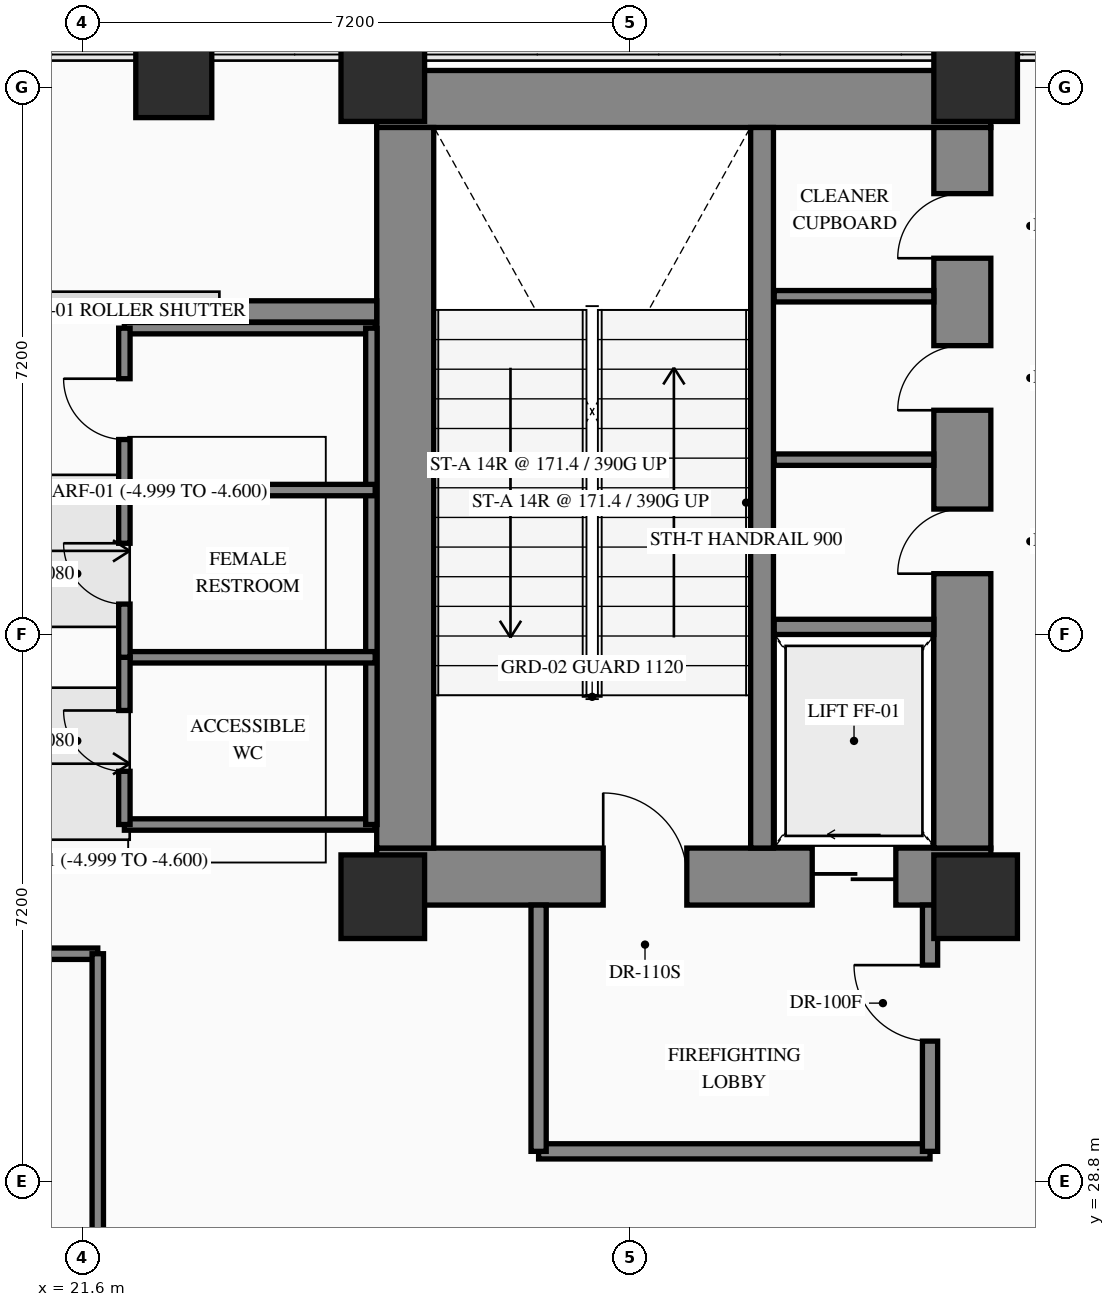
"""IFC4 building model, lengths in metres.
Left out: names, types, materials, properties, quantities, classifications, styles, units other than length and angle.
Written with IfcOpenShell. Run it as: python <this file> out.ifc"""

import sys

from ifc_helpers import new_model, si_unit, direction, frame, frame_2d, origin, origin_2d, place, context, subcontext, project, spatial, rectangle, hollow_rectangle, extrude, element, fill, save


model = new_model("IFC4")
c1 = context("Model", 3, precision=1e-05, world=origin(), true_north=direction((0.0, 1.0)))
c2 = subcontext(c1, "Body", "Model", "MODEL_VIEW")
j1 = project(units=[si_unit("LENGTHUNIT", "METRE"), si_unit("PLANEANGLEUNIT", "RADIAN")], contexts=[c1])
p1 = place(None, origin())
s1 = spatial("IfcSite", under=j1, at=p1, CompositionType="ELEMENT")
p2 = place(p1, origin())
s2 = spatial("IfcBuilding", under=s1, at=p2, CompositionType="ELEMENT")
p3 = place(p2, frame((0.0, 0.0, -4.8)))
s3 = spatial("IfcBuildingStorey", under=s2, at=p3, CompositionType="ELEMENT", Elevation=-4.8)
p4 = place(p3, frame((25.47, 32.815, 0.0), z_axis=(0.0, 0.0, 1.0), x_axis=(1.0, 0.0, 0.0)))
e1 = element("IfcWall", 1, at=p4, inside=s3, PredefinedType="SHEAR", context=c2, shape_type="SweptSolid", body=[
    extrude(rectangle(XDim=8.08, YDim=0.75, at=frame_2d((4.04, 0.0))), origin(), (0.0, 0.0, 1.0), 4.8),
])
p5 = place(p4, frame((2.98, 0.0, 0.0)))
e2 = element("IfcOpeningElement", 2, at=p5, cuts=e1, PredefinedType="OPENING", context=c2, shape_type="SweptSolid", body=[
    extrude(rectangle(XDim=1.1, YDim=2.2, at=frame_2d((0.55, 1.1))), frame((0.0, 0.385, 0.0), z_axis=(0.0, -1.0, 0.0), x_axis=(1.0, 0.0, 0.0)), (0.0, 0.0, 1.0), 0.77),
])
p6 = place(p4, frame((5.73, 0.0, 0.0)))
e3 = element("IfcOpeningElement", 3, at=p6, cuts=e1, PredefinedType="OPENING", context=c2, shape_type="SweptSolid", body=[
    extrude(rectangle(XDim=1.1, YDim=2.15, at=frame_2d((0.55, 1.075))), frame((0.0, 0.385, 0.0), z_axis=(0.0, -1.0, 0.0), x_axis=(1.0, 0.0, 0.0)), (0.0, 0.0, 1.0), 0.77),
])
p7 = place(p3, frame((25.47, 43.045, 0.0), z_axis=(0.0, 0.0, 1.0), x_axis=(1.0, 0.0, 0.0)))
e4 = element("IfcWall", 4, at=p7, inside=s3, PredefinedType="SHEAR", context=c2, shape_type="SweptSolid", body=[
    extrude(rectangle(XDim=8.08, YDim=0.75, at=frame_2d((4.04, 0.0))), origin(), (0.0, 0.0, 1.0), 4.8),
])
p8 = place(p3, frame((25.845, 33.19, 0.0), z_axis=(0.0, 0.0, 1.0), x_axis=(0.0, 1.0, 0.0)))
e5 = element("IfcWall", 5, at=p8, inside=s3, PredefinedType="SHEAR", context=c2, shape_type="SweptSolid", body=[
    extrude(rectangle(XDim=9.48, YDim=0.75, at=frame_2d((4.74, 0.0))), origin(), (0.0, 0.0, 1.0), 4.8),
])
p9 = place(p3, frame((33.175, 33.19, 0.0), z_axis=(0.0, 0.0, 1.0), x_axis=(0.0, 1.0, 0.0)))
e6 = element("IfcWall", 6, at=p9, inside=s3, PredefinedType="SHEAR", context=c2, shape_type="SweptSolid", body=[
    extrude(rectangle(XDim=9.48, YDim=0.75, at=frame_2d((4.74, 0.0))), origin(), (0.0, 0.0, 1.0), 4.8),
])
p10 = place(p9, frame((3.61, 0.0, 0.0)))
e7 = element("IfcOpeningElement", 7, at=p10, cuts=e6, PredefinedType="OPENING", context=c2, shape_type="SweptSolid", body=[
    extrude(rectangle(XDim=0.85, YDim=2.08, at=frame_2d((0.425, 1.04))), frame((0.0, 0.385, 0.0), z_axis=(0.0, -1.0, 0.0), x_axis=(1.0, 0.0, 0.0)), (0.0, 0.0, 1.0), 0.77),
])
p11 = place(p9, frame((5.76, 0.0, 0.0)))
e8 = element("IfcOpeningElement", 8, at=p11, cuts=e6, PredefinedType="OPENING", context=c2, shape_type="SweptSolid", body=[
    extrude(rectangle(XDim=0.85, YDim=2.08, at=frame_2d((0.425, 1.04))), frame((0.0, 0.385, 0.0), z_axis=(0.0, -1.0, 0.0), x_axis=(1.0, 0.0, 0.0)), (0.0, 0.0, 1.0), 0.77),
])
p12 = place(p9, frame((7.76, 0.0, 0.0)))
e9 = element("IfcOpeningElement", 9, at=p12, cuts=e6, PredefinedType="OPENING", context=c2, shape_type="SweptSolid", body=[
    extrude(rectangle(XDim=0.85, YDim=2.08, at=frame_2d((0.425, 1.04))), frame((0.0, 0.385, 0.0), z_axis=(0.0, -1.0, 0.0), x_axis=(1.0, 0.0, 0.0)), (0.0, 0.0, 1.0), 0.77),
])
p13 = place(p3, frame((30.54, 33.19, 0.0), z_axis=(0.0, 0.0, 1.0), x_axis=(0.0, 1.0, 0.0)))
e10 = element("IfcWall", 10, at=p13, inside=s3, PredefinedType="SHEAR", context=c2, shape_type="SweptSolid", body=[
    extrude(rectangle(XDim=9.48, YDim=0.3, at=frame_2d((4.74, 0.0))), origin(), (0.0, 0.0, 1.0), 4.8),
])
for number, where, z_axis, x_axis in (
    (11, (25.55, 32.55, 0.0), (0.0, 0.0, 1.0), (1.0, 0.0, 0.0)),
    (12, (33.35, 32.55, 0.0), (0.0, 0.0, 1.0), (1.0, 0.0, 0.0)),
    (13, (25.55, 43.3, 0.0), (0.0, 0.0, 1.0), (1.0, 0.0, 0.0)),
    (14, (33.35, 43.3, 0.0), (0.0, 0.0, 1.0), (1.0, 0.0, 0.0)),
):
    element("IfcColumn", number, at=place(p3, frame(where, z_axis=z_axis, x_axis=x_axis)), inside=s3, PredefinedType="COLUMN", context=c2, shape_type="SweptSolid", body=[
        extrude(rectangle(XDim=1.1, YDim=1.1, at=origin_2d()), origin(), (0.0, 0.0, 1.0), 4.8),
    ])
p14 = place(p3, frame((22.8, 43.3, 0.0), z_axis=(0.0, 0.0, 1.0), x_axis=(1.0, 0.0, 0.0)))
e15 = element("IfcColumn", 15, at=p14, inside=s3, PredefinedType="COLUMN", context=c2, shape_type="SweptSolid", body=[
    extrude(hollow_rectangle(XDim=1.0, YDim=1.0, WallThickness=0.038, at=origin_2d()), origin(), (0.0, 0.0, 1.0), 4.8),
])
p15 = place(p3, frame((0.8, 40.25, 0.0), z_axis=(0.0, 0.0, 1.0), x_axis=(1.0, 0.0, 0.0)))
e16 = element("IfcWall", 16, at=p15, inside=s3, PredefinedType="STANDARD", context=c2, shape_type="SweptSolid", body=[
    extrude(rectangle(XDim=24.67, YDim=0.28, at=frame_2d((12.335, 0.0))), origin(), (0.0, 0.0, 1.0), 3.5),
])
p16 = place(p15, frame((2.2, 0.0, 0.0)))
e17 = element("IfcOpeningElement", 17, at=p16, cuts=e16, PredefinedType="OPENING", context=c2, shape_type="SweptSolid", body=[
    extrude(rectangle(XDim=3.0, YDim=2.8, at=frame_2d((1.5, 1.4))), frame((0.0, 0.15, 0.0), z_axis=(0.0, -1.0, 0.0), x_axis=(1.0, 0.0, 0.0)), (0.0, 0.0, 1.0), 0.3),
])
p17 = place(p15, frame((6.4, 0.0, 0.0)))
e18 = element("IfcOpeningElement", 18, at=p17, cuts=e16, PredefinedType="OPENING", context=c2, shape_type="SweptSolid", body=[
    extrude(rectangle(XDim=3.0, YDim=2.8, at=frame_2d((1.5, 1.4))), frame((0.0, 0.15, 0.0), z_axis=(0.0, -1.0, 0.0), x_axis=(1.0, 0.0, 0.0)), (0.0, 0.0, 1.0), 0.3),
])
p18 = place(p15, frame((12.8, 0.0, 0.0)))
e19 = element("IfcOpeningElement", 19, at=p18, cuts=e16, PredefinedType="OPENING", context=c2, shape_type="SweptSolid", body=[
    extrude(rectangle(XDim=3.0, YDim=2.8, at=frame_2d((1.5, 1.4))), frame((0.0, 0.15, 0.0), z_axis=(0.0, -1.0, 0.0), x_axis=(1.0, 0.0, 0.0)), (0.0, 0.0, 1.0), 0.3),
])
p19 = place(p15, frame((19.6, 0.0, 0.0)))
e20 = element("IfcOpeningElement", 20, at=p19, cuts=e16, PredefinedType="OPENING", context=c2, shape_type="SweptSolid", body=[
    extrude(rectangle(XDim=3.0, YDim=2.8, at=frame_2d((1.5, 1.4))), frame((0.0, 0.15, 0.0), z_axis=(0.0, -1.0, 0.0), x_axis=(1.0, 0.0, 0.0)), (0.0, 0.0, 1.0), 0.3),
])
p20 = place(p3, frame((30.7, 36.1, 0.0), z_axis=(0.0, 0.0, 1.0), x_axis=(1.0, 0.0, 0.0)))
e21 = element("IfcWall", 21, at=p20, inside=s3, PredefinedType="STANDARD", context=c2, shape_type="SweptSolid", body=[
    extrude(rectangle(XDim=2.1, YDim=0.2, at=frame_2d((1.05, 0.0))), origin(), (0.0, 0.0, 1.0), 4.5),
])
for number, where, z_axis, x_axis in (
    (22, (30.7, 38.3, 0.0), (0.0, 0.0, 1.0), (1.0, 0.0, 0.0)),
    (23, (30.7, 40.45, 0.0), (0.0, 0.0, 1.0), (1.0, 0.0, 0.0)),
):
    element("IfcWall", number, at=place(p3, frame(where, z_axis=z_axis, x_axis=x_axis)), inside=s3, PredefinedType="PARTITIONING", context=c2, shape_type="SweptSolid", body=[
        extrude(rectangle(XDim=2.1, YDim=0.15, at=frame_2d((1.05, 0.0))), origin(), (0.0, 0.0, 1.0), 4.5),
    ])
p21 = place(p3, frame((27.6, 29.2, 0.0), z_axis=(0.0, 0.0, 1.0), x_axis=(1.0, 0.0, 0.0)))
e24 = element("IfcWall", 24, at=p21, inside=s3, PredefinedType="STANDARD", context=c2, shape_type="SweptSolid", body=[
    extrude(rectangle(XDim=5.15, YDim=0.2, at=frame_2d((2.575, 0.0))), origin(), (0.0, 0.0, 1.0), 4.5),
])
p22 = place(p3, frame((27.6, 29.2, 0.0), z_axis=(0.0, 0.0, 1.0), x_axis=(0.0, 1.0, 0.0)))
e25 = element("IfcWall", 25, at=p22, inside=s3, PredefinedType="STANDARD", context=c2, shape_type="SweptSolid", body=[
    extrude(rectangle(XDim=3.24, YDim=0.2, at=frame_2d((1.62, 0.0))), origin(), (0.0, 0.0, 1.0), 4.5),
])
p23 = place(p3, frame((32.75, 29.2, 0.0), z_axis=(0.0, 0.0, 1.0), x_axis=(0.0, 1.0, 0.0)))
e26 = element("IfcWall", 26, at=p23, inside=s3, PredefinedType="STANDARD", context=c2, shape_type="SweptSolid", body=[
    extrude(rectangle(XDim=3.24, YDim=0.2, at=frame_2d((1.62, 0.0))), origin(), (0.0, 0.0, 1.0), 4.5),
])
p24 = place(p23, frame((1.45, 0.0, 0.0)))
e27 = element("IfcOpeningElement", 27, at=p24, cuts=e26, PredefinedType="OPENING", context=c2, shape_type="SweptSolid", body=[
    extrude(rectangle(XDim=1.0, YDim=2.2, at=frame_2d((0.5, 1.1))), frame((0.0, 0.11, 0.0), z_axis=(0.0, -1.0, 0.0), x_axis=(1.0, 0.0, 0.0)), (0.0, 0.0, 1.0), 0.22),
])
for number, where, z_axis, x_axis in (
    (28, (22.15, 33.5, 0.0), (0.0, 0.0, 1.0), (1.0, 0.0, 0.0)),
    (29, (22.15, 40.03, 0.0), (0.0, 0.0, 1.0), (1.0, 0.0, 0.0)),
):
    element("IfcWall", number, at=place(p3, frame(where, z_axis=z_axis, x_axis=x_axis)), inside=s3, PredefinedType="PARTITIONING", context=c2, shape_type="SweptSolid", body=[
        extrude(rectangle(XDim=3.3, YDim=0.15, at=frame_2d((1.65, 0.0))), origin(), (0.0, 0.0, 1.0), 4.5),
    ])
p25 = place(p3, frame((25.4, 33.5, 0.0), z_axis=(0.0, 0.0, 1.0), x_axis=(0.0, 1.0, 0.0)))
e30 = element("IfcWall", 30, at=p25, inside=s3, PredefinedType="PARTITIONING", context=c2, shape_type="SweptSolid", body=[
    extrude(rectangle(XDim=6.53, YDim=0.15, at=frame_2d((3.265, 0.0))), origin(), (0.0, 0.0, 1.0), 4.5),
])
for number, where, z_axis, x_axis in (
    (31, (22.15, 35.7, 0.0), (0.0, 0.0, 1.0), (1.0, 0.0, 0.0)),
    (32, (22.15, 37.9, 0.0), (0.0, 0.0, 1.0), (1.0, 0.0, 0.0)),
):
    element("IfcWall", number, at=place(p3, frame(where, z_axis=z_axis, x_axis=x_axis)), inside=s3, PredefinedType="PARTITIONING", context=c2, shape_type="SweptSolid", body=[
        extrude(rectangle(XDim=3.3, YDim=0.15, at=frame_2d((1.65, 0.0))), origin(), (0.0, 0.0, 1.0), 4.5),
    ])
p26 = place(p3, frame((22.15, 33.5, 0.0), z_axis=(0.0, 0.0, 1.0), x_axis=(0.0, 1.0, 0.0)))
e33 = element("IfcWall", 33, at=p26, inside=s3, PredefinedType="PARTITIONING", context=c2, shape_type="SweptSolid", body=[
    extrude(rectangle(XDim=2.2, YDim=0.15, at=frame_2d((1.1, 0.0))), origin(), (0.0, 0.0, 1.0), 4.5),
])
p27 = place(p26, frame((0.7, 0.0, 0.0)))
e34 = element("IfcOpeningElement", 34, at=p27, cuts=e33, PredefinedType="OPENING", context=c2, shape_type="SweptSolid", body=[
    extrude(rectangle(XDim=0.8, YDim=2.06, at=frame_2d((0.4, 1.03))), frame((0.0, 0.085, 0.0), z_axis=(0.0, -1.0, 0.0), x_axis=(1.0, 0.0, 0.0)), (0.0, 0.0, 1.0), 0.17),
])
p28 = place(p3, frame((22.15, 35.7, 0.0), z_axis=(0.0, 0.0, 1.0), x_axis=(0.0, 1.0, 0.0)))
e35 = element("IfcWall", 35, at=p28, inside=s3, PredefinedType="PARTITIONING", context=c2, shape_type="SweptSolid", body=[
    extrude(rectangle(XDim=2.2, YDim=0.15, at=frame_2d((1.1, 0.0))), origin(), (0.0, 0.0, 1.0), 4.5),
])
p29 = place(p28, frame((0.7, 0.0, 0.0)))
e36 = element("IfcOpeningElement", 36, at=p29, cuts=e35, PredefinedType="OPENING", context=c2, shape_type="SweptSolid", body=[
    extrude(rectangle(XDim=0.8, YDim=2.06, at=frame_2d((0.4, 1.03))), frame((0.0, 0.085, 0.0), z_axis=(0.0, -1.0, 0.0), x_axis=(1.0, 0.0, 0.0)), (0.0, 0.0, 1.0), 0.17),
])
p30 = place(p3, frame((22.15, 37.9, 0.0), z_axis=(0.0, 0.0, 1.0), x_axis=(0.0, 1.0, 0.0)))
e37 = element("IfcWall", 37, at=p30, inside=s3, PredefinedType="PARTITIONING", context=c2, shape_type="SweptSolid", body=[
    extrude(rectangle(XDim=2.13, YDim=0.15, at=frame_2d((1.065, 0.0))), origin(), (0.0, 0.0, 1.0), 4.5),
])
p31 = place(p30, frame((0.665, 0.0, 0.0)))
e38 = element("IfcOpeningElement", 38, at=p31, cuts=e37, PredefinedType="OPENING", context=c2, shape_type="SweptSolid", body=[
    extrude(rectangle(XDim=0.8, YDim=2.06, at=frame_2d((0.4, 1.03))), frame((0.0, 0.085, 0.0), z_axis=(0.0, -1.0, 0.0), x_axis=(1.0, 0.0, 0.0)), (0.0, 0.0, 1.0), 0.17),
])
p32 = place(p3, frame((15.8, 31.8, 0.0), z_axis=(0.0, 0.0, 1.0), x_axis=(1.0, 0.0, 0.0)))
e39 = element("IfcWall", 39, at=p32, inside=s3, PredefinedType="PARTITIONING", context=c2, shape_type="SweptSolid", body=[
    extrude(rectangle(XDim=6.0, YDim=0.15, at=frame_2d((3.0, 0.0))), origin(), (0.0, 0.0, 1.0), 4.5),
])
p33 = place(p32, frame((2.45, 0.0, 0.0)))
e40 = element("IfcOpeningElement", 40, at=p33, cuts=e39, PredefinedType="OPENING", context=c2, shape_type="SweptSolid", body=[
    extrude(rectangle(XDim=1.1, YDim=2.24, at=frame_2d((0.55, 1.12))), frame((0.0, 0.085, 0.0), z_axis=(0.0, -1.0, 0.0), x_axis=(1.0, 0.0, 0.0)), (0.0, 0.0, 1.0), 0.17),
])
p34 = place(p3, frame((21.8, 23.6, 0.0), z_axis=(0.0, 0.0, 1.0), x_axis=(0.0, 1.0, 0.0)))
e41 = element("IfcWall", 41, at=p34, inside=s3, PredefinedType="PARTITIONING", context=c2, shape_type="SweptSolid", body=[
    extrude(rectangle(XDim=8.2, YDim=0.15, at=frame_2d((4.1, 0.0))), origin(), (0.0, 0.0, 1.0), 4.5),
])
p35 = place(p19, origin())
e42 = element("IfcDoor", 42, at=p35, inside=s3, OperationType="ROLLINGUP", PredefinedType="TRAPDOOR", context=c2, shape_type="SweptSolid", body=[
    extrude(rectangle(XDim=3.0, YDim=2.8, at=frame_2d((1.5, 1.4))), frame((0.0, 0.025, 0.0), z_axis=(0.0, -1.0, 0.0), x_axis=(1.0, 0.0, 0.0)), (0.0, 0.0, 1.0), 0.05),
])
fill(e20, e42)
p36 = place(p5, origin())
e43 = element("IfcDoor", 43, at=p36, inside=s3, OperationType="SINGLE_SWING_LEFT", PredefinedType="DOOR", context=c2, shape_type="SweptSolid", body=[
    extrude(rectangle(XDim=1.1, YDim=2.2, at=frame_2d((0.55, 1.1))), frame((0.0, 0.025, 0.0), z_axis=(0.0, -1.0, 0.0), x_axis=(1.0, 0.0, 0.0)), (0.0, 0.0, 1.0), 0.05),
])
fill(e2, e43)
p37 = place(p6, origin())
e44 = element("IfcDoor", 44, at=p37, inside=s3, OperationType="SLIDING_TO_LEFT", PredefinedType="USERDEFINED", context=c2, shape_type="SweptSolid", body=[
    extrude(rectangle(XDim=1.1, YDim=2.15, at=frame_2d((0.55, 1.075))), frame((0.0, 0.025, 0.0), z_axis=(0.0, -1.0, 0.0), x_axis=(1.0, 0.0, 0.0)), (0.0, 0.0, 1.0), 0.05),
])
fill(e3, e44)
p38 = place(p10, origin())
e45 = element("IfcDoor", 45, at=p38, inside=s3, OperationType="SINGLE_SWING_LEFT", PredefinedType="DOOR", context=c2, shape_type="SweptSolid", body=[
    extrude(rectangle(XDim=0.85, YDim=2.08, at=frame_2d((0.425, 1.04))), frame((0.0, 0.025, 0.0), z_axis=(0.0, -1.0, 0.0), x_axis=(1.0, 0.0, 0.0)), (0.0, 0.0, 1.0), 0.05),
])
fill(e7, e45)
p39 = place(p11, origin())
e46 = element("IfcDoor", 46, at=p39, inside=s3, OperationType="SINGLE_SWING_LEFT", PredefinedType="DOOR", context=c2, shape_type="SweptSolid", body=[
    extrude(rectangle(XDim=0.85, YDim=2.08, at=frame_2d((0.425, 1.04))), frame((0.0, 0.025, 0.0), z_axis=(0.0, -1.0, 0.0), x_axis=(1.0, 0.0, 0.0)), (0.0, 0.0, 1.0), 0.05),
])
fill(e8, e46)
p40 = place(p12, origin())
e47 = element("IfcDoor", 47, at=p40, inside=s3, OperationType="SINGLE_SWING_LEFT", PredefinedType="DOOR", context=c2, shape_type="SweptSolid", body=[
    extrude(rectangle(XDim=0.85, YDim=2.08, at=frame_2d((0.425, 1.04))), frame((0.0, 0.025, 0.0), z_axis=(0.0, -1.0, 0.0), x_axis=(1.0, 0.0, 0.0)), (0.0, 0.0, 1.0), 0.05),
])
fill(e9, e47)
p41 = place(p24, origin())
e48 = element("IfcDoor", 48, at=p41, inside=s3, OperationType="SINGLE_SWING_RIGHT", PredefinedType="DOOR", context=c2, shape_type="SweptSolid", body=[
    extrude(rectangle(XDim=1.0, YDim=2.2, at=frame_2d((0.5, 1.1))), frame((0.0, 0.025, 0.0), z_axis=(0.0, -1.0, 0.0), x_axis=(1.0, 0.0, 0.0)), (0.0, 0.0, 1.0), 0.05),
])
fill(e27, e48)
p42 = place(p27, origin())
e49 = element("IfcDoor", 49, at=p42, inside=s3, OperationType="SINGLE_SWING_RIGHT", PredefinedType="DOOR", context=c2, shape_type="SweptSolid", body=[
    extrude(rectangle(XDim=0.8, YDim=2.06, at=frame_2d((0.4, 1.03))), frame((0.0, 0.025, 0.0), z_axis=(0.0, -1.0, 0.0), x_axis=(1.0, 0.0, 0.0)), (0.0, 0.0, 1.0), 0.05),
])
fill(e34, e49)
p43 = place(p29, origin())
e50 = element("IfcDoor", 50, at=p43, inside=s3, OperationType="SINGLE_SWING_RIGHT", PredefinedType="DOOR", context=c2, shape_type="SweptSolid", body=[
    extrude(rectangle(XDim=0.8, YDim=2.06, at=frame_2d((0.4, 1.03))), frame((0.0, 0.025, 0.0), z_axis=(0.0, -1.0, 0.0), x_axis=(1.0, 0.0, 0.0)), (0.0, 0.0, 1.0), 0.05),
])
fill(e36, e50)
p44 = place(p31, origin())
e51 = element("IfcDoor", 51, at=p44, inside=s3, OperationType="SINGLE_SWING_RIGHT", PredefinedType="DOOR", context=c2, shape_type="SweptSolid", body=[
    extrude(rectangle(XDim=0.8, YDim=2.06, at=frame_2d((0.4, 1.03))), frame((0.0, 0.025, 0.0), z_axis=(0.0, -1.0, 0.0), x_axis=(1.0, 0.0, 0.0)), (0.0, 0.0, 1.0), 0.05),
])
fill(e38, e51)
save(model, sys.argv[1])
